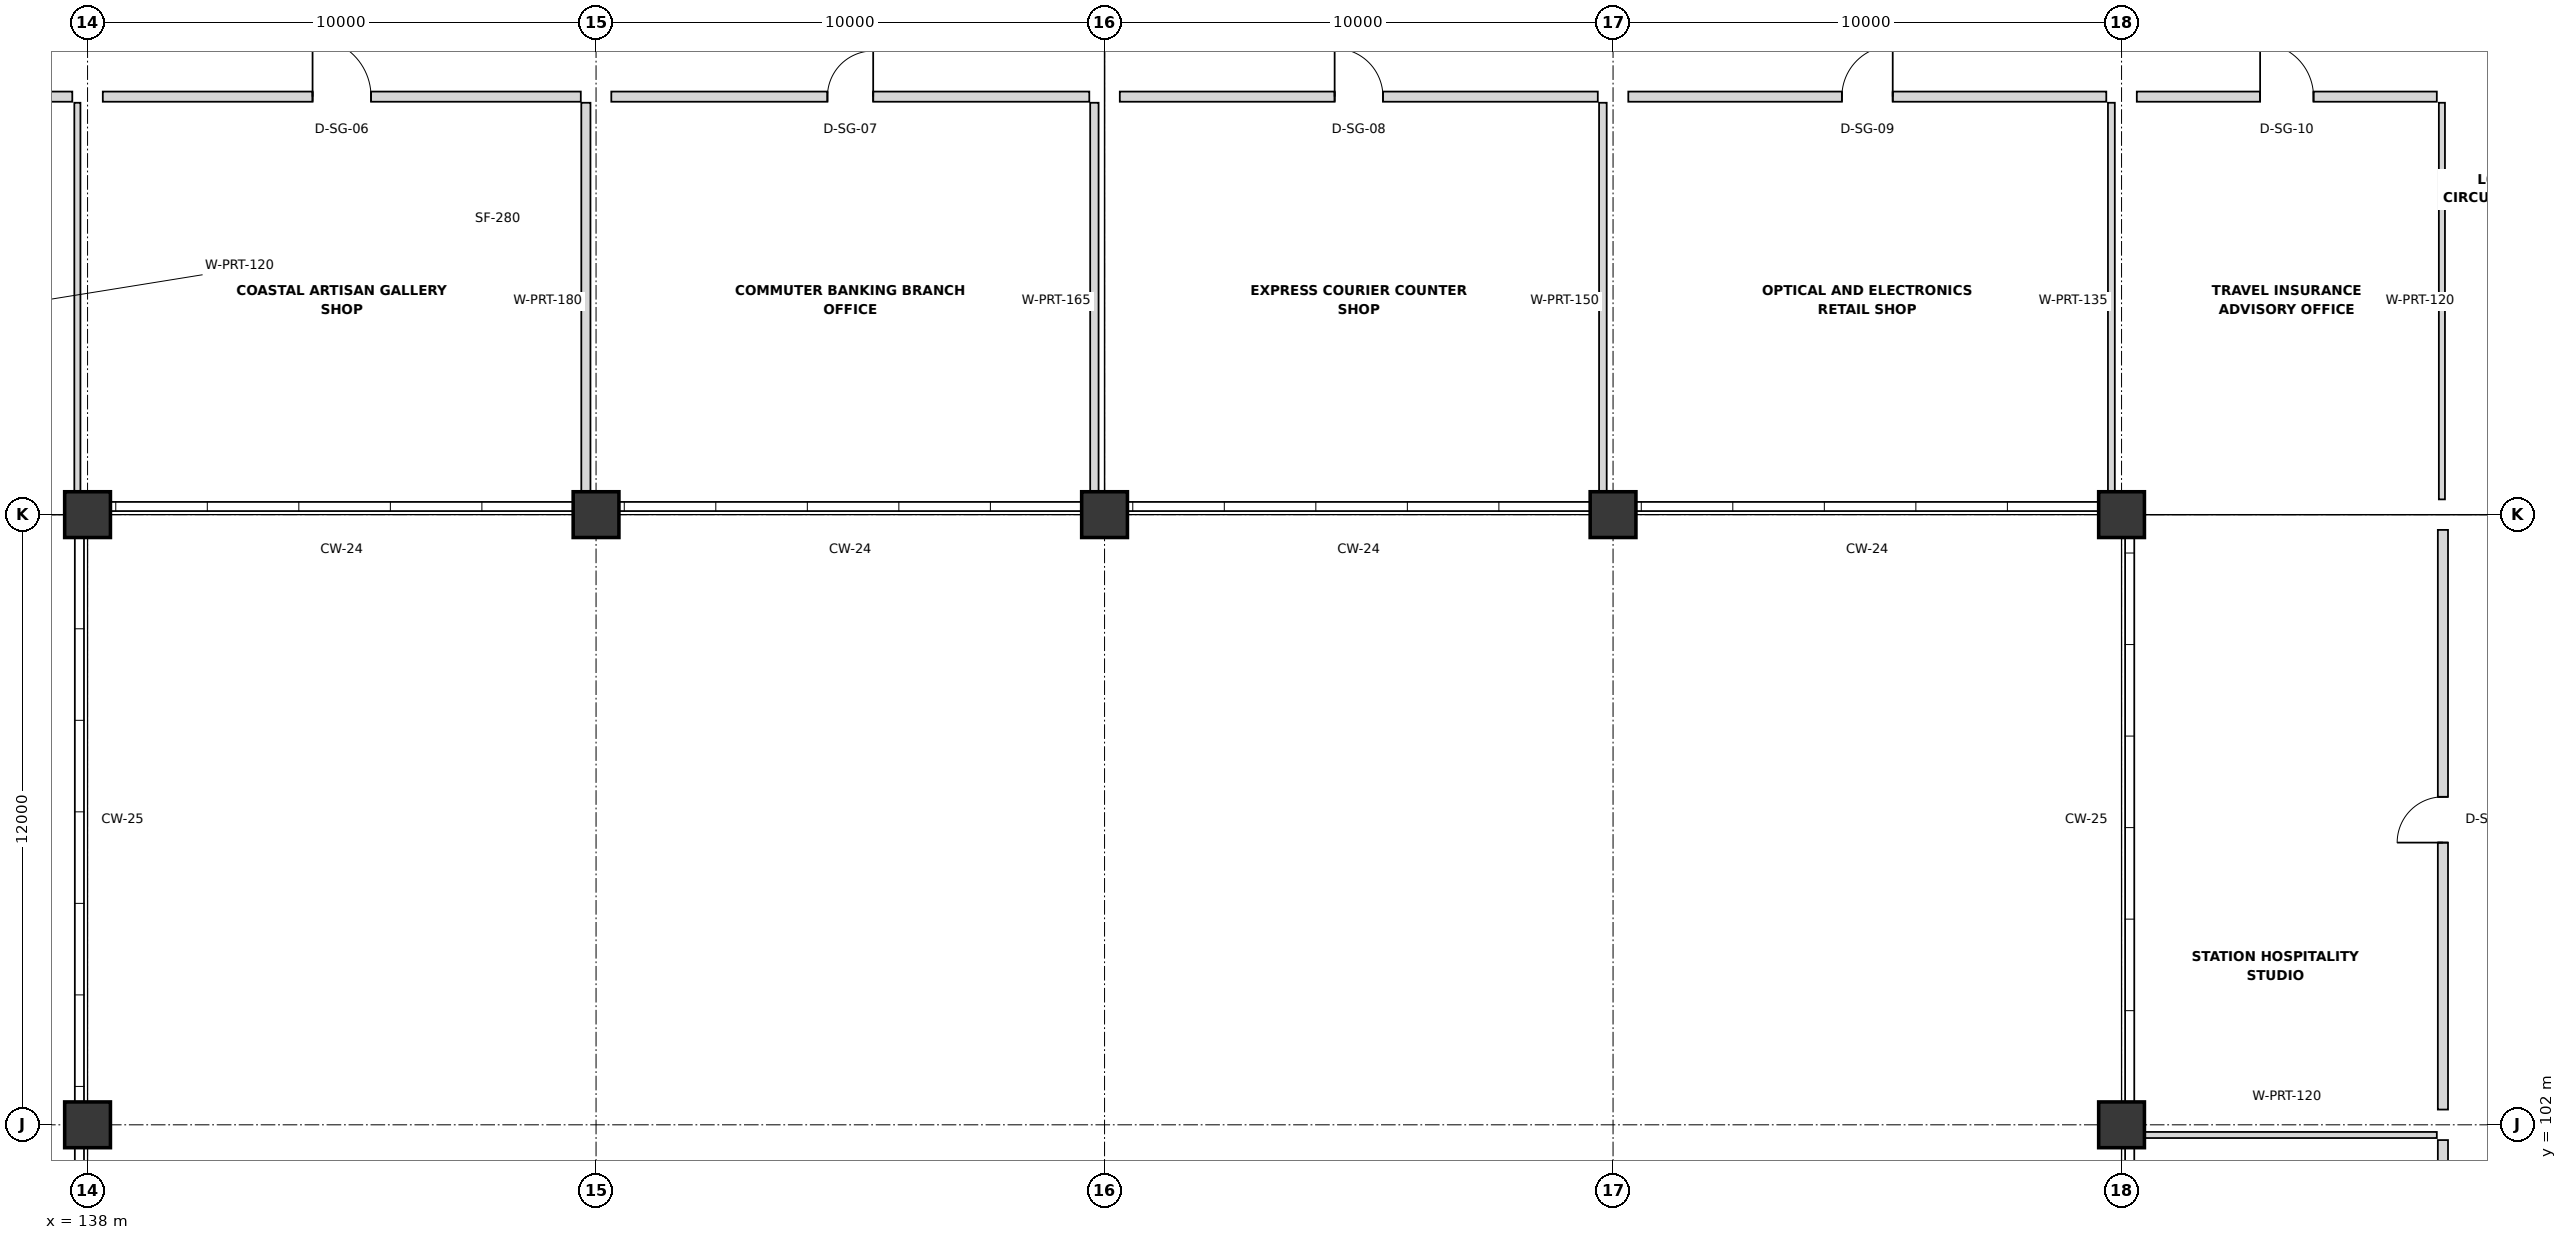
"""IFC4 building model, lengths in metres.
Left out: names, types, materials, properties, quantities, classifications, styles, units other than length and angle.
Written with IfcOpenShell. Run it as: python <this file> out.ifc"""

import sys

from ifc_helpers import new_model, si_unit, direction, frame, frame_2d, origin, origin_2d, place, context, subcontext, project, spatial, rectangle, extrude, element, fill, save


model = new_model("IFC4")
c1 = context("Model", 3, precision=1e-05, world=origin(), true_north=direction((0.0, 1.0)))
c2 = subcontext(c1, "Body", "Model", "MODEL_VIEW")
j1 = project(units=[si_unit("LENGTHUNIT", "METRE"), si_unit("PLANEANGLEUNIT", "RADIAN")], contexts=[c1])
p1 = place(None, origin())
s1 = spatial("IfcSite", under=j1, at=p1, CompositionType="ELEMENT")
p2 = place(p1, origin())
s2 = spatial("IfcBuilding", under=s1, at=p2, CompositionType="ELEMENT")
p3 = place(p2, frame((0.0, 0.0, 5.4)))
s3 = spatial("IfcBuildingStorey", under=s2, at=p3, CompositionType="ELEMENT", Elevation=5.4)
for number, where, z_axis, x_axis in (
    (1, (138.0, 102.0, 0.0), (0.0, 0.0, 1.0), (1.0, 0.0, 0.0)),
    (2, (138.0, 114.0, 0.0), (0.0, 0.0, 1.0), (1.0, 0.0, 0.0)),
    (3, (148.0, 114.0, 0.0), (0.0, 0.0, 1.0), (1.0, 0.0, 0.0)),
    (4, (158.0, 114.0, 0.0), (0.0, 0.0, 1.0), (1.0, 0.0, 0.0)),
    (5, (168.0, 114.0, 0.0), (0.0, 0.0, 1.0), (1.0, 0.0, 0.0)),
    (6, (178.0, 102.0, 0.0), (0.0, 0.0, 1.0), (1.0, 0.0, 0.0)),
    (7, (178.0, 114.0, 0.0), (0.0, 0.0, 1.0), (1.0, 0.0, 0.0)),
):
    element("IfcColumn", number, at=place(p3, frame(where, z_axis=z_axis, x_axis=x_axis)), inside=s3, PredefinedType="COLUMN", context=c2, shape_type="SweptSolid", body=[
        extrude(rectangle(XDim=0.9, YDim=0.9, at=origin_2d()), origin(), (0.0, 0.0, 1.0), 4.2),
    ])
p4 = place(p3, frame((131.8, 122.22, 0.0), z_axis=(0.0, 0.0, 1.0), x_axis=(1.0, 0.0, 0.0)))
e8 = element("IfcWall", 8, at=p4, inside=s3, PredefinedType="PARTITIONING", context=c2, shape_type="SweptSolid", body=[
    extrude(rectangle(XDim=5.9, YDim=0.2, at=frame_2d((2.95, 0.0))), origin(), (0.0, 0.0, 1.0), 3.118),
])
p5 = place(p4, frame((2.4, 0.0, 0.0)))
e9 = element("IfcOpeningElement", 9, at=p5, cuts=e8, PredefinedType="OPENING", context=c2, shape_type="SweptSolid", body=[
    extrude(rectangle(XDim=1.1, YDim=2.1, at=frame_2d((0.55, 1.05))), frame((0.0, 0.11, 0.0), z_axis=(0.0, -1.0, 0.0), x_axis=(1.0, 0.0, 0.0)), (0.0, 0.0, 1.0), 0.22),
])
p6 = place(p3, frame((137.8, 114.3, 0.0), z_axis=(0.0, 0.0, 1.0), x_axis=(0.0, 1.0, 0.0)))
e10 = element("IfcWall", 10, at=p6, inside=s3, PredefinedType="PARTITIONING", context=c2, shape_type="SweptSolid", body=[
    extrude(rectangle(XDim=7.8, YDim=0.12, at=frame_2d((3.9, 0.0))), origin(), (0.0, 0.0, 1.0), 3.018),
])
p7 = place(p3, frame((138.3, 122.22, 0.0), z_axis=(0.0, 0.0, 1.0), x_axis=(1.0, 0.0, 0.0)))
e11 = element("IfcWall", 11, at=p7, inside=s3, PredefinedType="PARTITIONING", context=c2, shape_type="SweptSolid", body=[
    extrude(rectangle(XDim=9.4, YDim=0.2, at=frame_2d((4.7, 0.0))), origin(), (0.0, 0.0, 1.0), 3.118),
])
p8 = place(p7, frame((4.125, 0.0, 0.0)))
e12 = element("IfcOpeningElement", 12, at=p8, cuts=e11, PredefinedType="OPENING", context=c2, shape_type="SweptSolid", body=[
    extrude(rectangle(XDim=1.15, YDim=2.1, at=frame_2d((0.575, 1.05))), frame((0.0, 0.11, 0.0), z_axis=(0.0, -1.0, 0.0), x_axis=(1.0, 0.0, 0.0)), (0.0, 0.0, 1.0), 0.22),
])
p9 = place(p3, frame((147.8, 114.3, 0.0), z_axis=(0.0, 0.0, 1.0), x_axis=(0.0, 1.0, 0.0)))
e13 = element("IfcWall", 13, at=p9, inside=s3, PredefinedType="PARTITIONING", context=c2, shape_type="SweptSolid", body=[
    extrude(rectangle(XDim=7.8, YDim=0.18, at=frame_2d((3.9, 0.0))), origin(), (0.0, 0.0, 1.0), 3.018),
])
p10 = place(p3, frame((148.3, 122.22, 0.0), z_axis=(0.0, 0.0, 1.0), x_axis=(1.0, 0.0, 0.0)))
e14 = element("IfcWall", 14, at=p10, inside=s3, PredefinedType="PARTITIONING", context=c2, shape_type="SweptSolid", body=[
    extrude(rectangle(XDim=9.4, YDim=0.2, at=frame_2d((4.7, 0.0))), origin(), (0.0, 0.0, 1.0), 3.118),
])
p11 = place(p10, frame((4.25, 0.0, 0.0)))
e15 = element("IfcOpeningElement", 15, at=p11, cuts=e14, PredefinedType="OPENING", context=c2, shape_type="SweptSolid", body=[
    extrude(rectangle(XDim=0.9, YDim=2.2, at=frame_2d((0.45, 1.1))), frame((0.0, 0.11, 0.0), z_axis=(0.0, -1.0, 0.0), x_axis=(1.0, 0.0, 0.0)), (0.0, 0.0, 1.0), 0.22),
])
p12 = place(p3, frame((157.8, 114.3, 0.0), z_axis=(0.0, 0.0, 1.0), x_axis=(0.0, 1.0, 0.0)))
e16 = element("IfcWall", 16, at=p12, inside=s3, PredefinedType="PARTITIONING", context=c2, shape_type="SweptSolid", body=[
    extrude(rectangle(XDim=7.8, YDim=0.165, at=frame_2d((3.9, 0.0))), origin(), (0.0, 0.0, 1.0), 3.018),
])
p13 = place(p3, frame((158.3, 122.22, 0.0), z_axis=(0.0, 0.0, 1.0), x_axis=(1.0, 0.0, 0.0)))
e17 = element("IfcWall", 17, at=p13, inside=s3, PredefinedType="PARTITIONING", context=c2, shape_type="SweptSolid", body=[
    extrude(rectangle(XDim=9.4, YDim=0.2, at=frame_2d((4.7, 0.0))), origin(), (0.0, 0.0, 1.0), 3.118),
])
p14 = place(p13, frame((4.225, 0.0, 0.0)))
e18 = element("IfcOpeningElement", 18, at=p14, cuts=e17, PredefinedType="OPENING", context=c2, shape_type="SweptSolid", body=[
    extrude(rectangle(XDim=0.95, YDim=2.2, at=frame_2d((0.475, 1.1))), frame((0.0, 0.11, 0.0), z_axis=(0.0, -1.0, 0.0), x_axis=(1.0, 0.0, 0.0)), (0.0, 0.0, 1.0), 0.22),
])
p15 = place(p3, frame((167.8, 114.3, 0.0), z_axis=(0.0, 0.0, 1.0), x_axis=(0.0, 1.0, 0.0)))
e19 = element("IfcWall", 19, at=p15, inside=s3, PredefinedType="PARTITIONING", context=c2, shape_type="SweptSolid", body=[
    extrude(rectangle(XDim=7.8, YDim=0.15, at=frame_2d((3.9, 0.0))), origin(), (0.0, 0.0, 1.0), 3.018),
])
p16 = place(p3, frame((168.3, 122.22, 0.0), z_axis=(0.0, 0.0, 1.0), x_axis=(1.0, 0.0, 0.0)))
e20 = element("IfcWall", 20, at=p16, inside=s3, PredefinedType="PARTITIONING", context=c2, shape_type="SweptSolid", body=[
    extrude(rectangle(XDim=9.4, YDim=0.2, at=frame_2d((4.7, 0.0))), origin(), (0.0, 0.0, 1.0), 3.118),
])
p17 = place(p16, frame((4.2, 0.0, 0.0)))
e21 = element("IfcOpeningElement", 21, at=p17, cuts=e20, PredefinedType="OPENING", context=c2, shape_type="SweptSolid", body=[
    extrude(rectangle(XDim=1.0, YDim=2.2, at=frame_2d((0.5, 1.1))), frame((0.0, 0.11, 0.0), z_axis=(0.0, -1.0, 0.0), x_axis=(1.0, 0.0, 0.0)), (0.0, 0.0, 1.0), 0.22),
])
p18 = place(p3, frame((177.8, 114.3, 0.0), z_axis=(0.0, 0.0, 1.0), x_axis=(0.0, 1.0, 0.0)))
e22 = element("IfcWall", 22, at=p18, inside=s3, PredefinedType="PARTITIONING", context=c2, shape_type="SweptSolid", body=[
    extrude(rectangle(XDim=7.8, YDim=0.135, at=frame_2d((3.9, 0.0))), origin(), (0.0, 0.0, 1.0), 3.018),
])
p19 = place(p3, frame((178.3, 122.22, 0.0), z_axis=(0.0, 0.0, 1.0), x_axis=(1.0, 0.0, 0.0)))
e23 = element("IfcWall", 23, at=p19, inside=s3, PredefinedType="PARTITIONING", context=c2, shape_type="SweptSolid", body=[
    extrude(rectangle(XDim=5.9, YDim=0.2, at=frame_2d((2.95, 0.0))), origin(), (0.0, 0.0, 1.0), 3.118),
])
p20 = place(p19, frame((2.425, 0.0, 0.0)))
e24 = element("IfcOpeningElement", 24, at=p20, cuts=e23, PredefinedType="OPENING", context=c2, shape_type="SweptSolid", body=[
    extrude(rectangle(XDim=1.05, YDim=2.2, at=frame_2d((0.525, 1.1))), frame((0.0, 0.11, 0.0), z_axis=(0.0, -1.0, 0.0), x_axis=(1.0, 0.0, 0.0)), (0.0, 0.0, 1.0), 0.22),
])
p21 = place(p3, frame((184.3, 114.3, 0.0), z_axis=(0.0, 0.0, 1.0), x_axis=(0.0, 1.0, 0.0)))
e25 = element("IfcWall", 25, at=p21, inside=s3, PredefinedType="PARTITIONING", context=c2, shape_type="SweptSolid", body=[
    extrude(rectangle(XDim=7.8, YDim=0.12, at=frame_2d((3.9, 0.0))), origin(), (0.0, 0.0, 1.0), 3.018),
])
p22 = place(p3, frame((184.32, 78.3, 0.0), z_axis=(0.0, 0.0, 1.0), x_axis=(0.0, 1.0, 0.0)))
e26 = element("IfcWall", 26, at=p22, inside=s3, PredefinedType="PARTITIONING", context=c2, shape_type="SweptSolid", body=[
    extrude(rectangle(XDim=23.4, YDim=0.2, at=frame_2d((11.7, 0.0))), origin(), (0.0, 0.0, 1.0), 3.018),
])
p23 = place(p22, frame((5.125, 0.0, 0.0)))
e27 = element("IfcOpeningElement", 27, at=p23, cuts=e26, PredefinedType="OPENING", context=c2, shape_type="SweptSolid", body=[
    extrude(rectangle(XDim=1.15, YDim=2.3, at=frame_2d((0.575, 1.15))), frame((0.0, 0.11, 0.0), z_axis=(0.0, -1.0, 0.0), x_axis=(1.0, 0.0, 0.0)), (0.0, 0.0, 1.0), 0.22),
])
p24 = place(p3, frame((178.3, 101.8, 0.0), z_axis=(0.0, 0.0, 1.0), x_axis=(1.0, 0.0, 0.0)))
e28 = element("IfcWall", 28, at=p24, inside=s3, PredefinedType="PARTITIONING", context=c2, shape_type="SweptSolid", body=[
    extrude(rectangle(XDim=5.9, YDim=0.12, at=frame_2d((2.95, 0.0))), origin(), (0.0, 0.0, 1.0), 3.018),
])
p25 = place(p3, frame((184.32, 102.3, 0.0), z_axis=(0.0, 0.0, 1.0), x_axis=(0.0, 1.0, 0.0)))
e29 = element("IfcWall", 29, at=p25, inside=s3, PredefinedType="PARTITIONING", context=c2, shape_type="SweptSolid", body=[
    extrude(rectangle(XDim=11.4, YDim=0.2, at=frame_2d((5.7, 0.0))), origin(), (0.0, 0.0, 1.0), 3.018),
])
p26 = place(p25, frame((5.25, 0.0, 0.0)))
e30 = element("IfcOpeningElement", 30, at=p26, cuts=e29, PredefinedType="OPENING", context=c2, shape_type="SweptSolid", body=[
    extrude(rectangle(XDim=0.9, YDim=2.1, at=frame_2d((0.45, 1.05))), frame((0.0, 0.11, 0.0), z_axis=(0.0, -1.0, 0.0), x_axis=(1.0, 0.0, 0.0)), (0.0, 0.0, 1.0), 0.22),
])
p27 = place(p8, origin())
e31 = element("IfcDoor", 31, at=p27, inside=s3, OperationType="SINGLE_SWING_LEFT", PredefinedType="DOOR", context=c2, shape_type="SweptSolid", body=[
    extrude(rectangle(XDim=1.15, YDim=2.1, at=frame_2d((0.575, 1.05))), frame((0.0, 0.025, 0.0), z_axis=(0.0, -1.0, 0.0), x_axis=(1.0, 0.0, 0.0)), (0.0, 0.0, 1.0), 0.05),
])
fill(e12, e31)
p28 = place(p11, origin())
e32 = element("IfcDoor", 32, at=p28, inside=s3, OperationType="SINGLE_SWING_RIGHT", PredefinedType="DOOR", context=c2, shape_type="SweptSolid", body=[
    extrude(rectangle(XDim=0.9, YDim=2.2, at=frame_2d((0.45, 1.1))), frame((0.0, 0.025, 0.0), z_axis=(0.0, -1.0, 0.0), x_axis=(1.0, 0.0, 0.0)), (0.0, 0.0, 1.0), 0.05),
])
fill(e15, e32)
p29 = place(p14, origin())
e33 = element("IfcDoor", 33, at=p29, inside=s3, OperationType="SINGLE_SWING_LEFT", PredefinedType="DOOR", context=c2, shape_type="SweptSolid", body=[
    extrude(rectangle(XDim=0.95, YDim=2.2, at=frame_2d((0.475, 1.1))), frame((0.0, 0.025, 0.0), z_axis=(0.0, -1.0, 0.0), x_axis=(1.0, 0.0, 0.0)), (0.0, 0.0, 1.0), 0.05),
])
fill(e18, e33)
p30 = place(p17, origin())
e34 = element("IfcDoor", 34, at=p30, inside=s3, OperationType="SINGLE_SWING_RIGHT", PredefinedType="DOOR", context=c2, shape_type="SweptSolid", body=[
    extrude(rectangle(XDim=1.0, YDim=2.2, at=frame_2d((0.5, 1.1))), frame((0.0, 0.025, 0.0), z_axis=(0.0, -1.0, 0.0), x_axis=(1.0, 0.0, 0.0)), (0.0, 0.0, 1.0), 0.05),
])
fill(e21, e34)
p31 = place(p20, origin())
e35 = element("IfcDoor", 35, at=p31, inside=s3, OperationType="SINGLE_SWING_LEFT", PredefinedType="DOOR", context=c2, shape_type="SweptSolid", body=[
    extrude(rectangle(XDim=1.05, YDim=2.2, at=frame_2d((0.525, 1.1))), frame((0.0, 0.025, 0.0), z_axis=(0.0, -1.0, 0.0), x_axis=(1.0, 0.0, 0.0)), (0.0, 0.0, 1.0), 0.05),
])
fill(e24, e35)
p32 = place(p26, origin())
e36 = element("IfcDoor", 36, at=p32, inside=s3, OperationType="SINGLE_SWING_LEFT", PredefinedType="DOOR", context=c2, shape_type="SweptSolid", body=[
    extrude(rectangle(XDim=0.9, YDim=2.1, at=frame_2d((0.45, 1.05))), frame((0.0, 0.025, 0.0), z_axis=(0.0, -1.0, 0.0), x_axis=(1.0, 0.0, 0.0)), (0.0, 0.0, 1.0), 0.05),
])
fill(e30, e36)
save(model, sys.argv[1])
